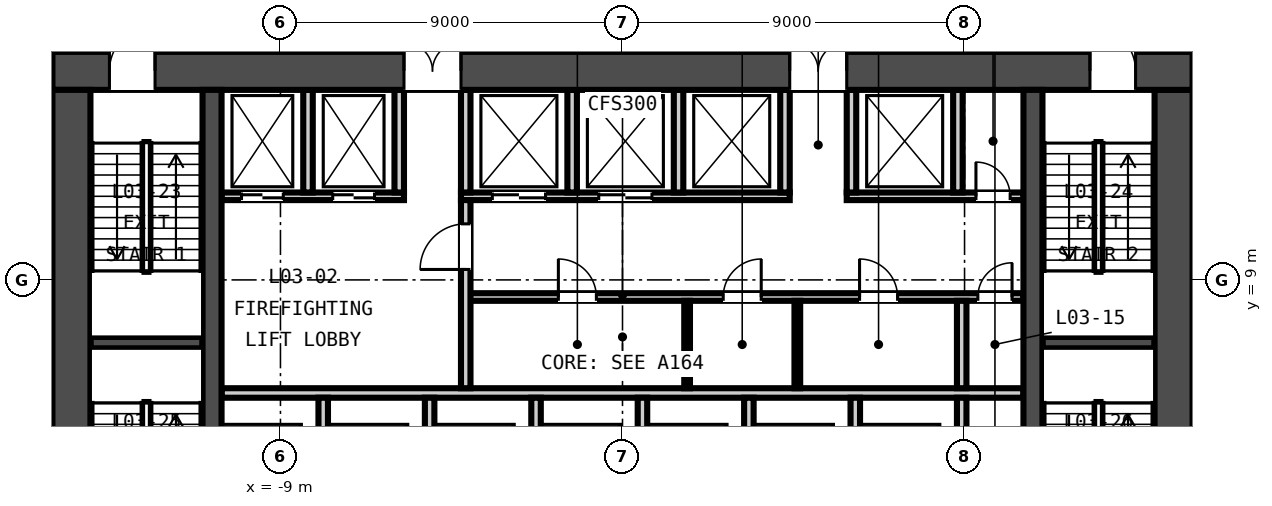
"""IFC4 building model, lengths in metres.
Left out: names, types, materials, properties, quantities, classifications, styles, units other than length and angle.
Written with IfcOpenShell. Run it as: python <this file> out.ifc"""

import sys

from ifc_helpers import new_model, si_unit, direction, frame, frame_2d, origin, place, context, subcontext, project, spatial, rectangle, extrude, element, fill, save


model = new_model("IFC4")
c1 = context("Model", 3, precision=1e-05, world=origin(), true_north=direction((0.0, 1.0)))
c2 = subcontext(c1, "Body", "Model", "MODEL_VIEW")
j1 = project(units=[si_unit("LENGTHUNIT", "METRE"), si_unit("PLANEANGLEUNIT", "RADIAN")], contexts=[c1])
p1 = place(None, origin())
s1 = spatial("IfcSite", under=j1, at=p1, CompositionType="ELEMENT")
p2 = place(p1, origin())
s2 = spatial("IfcBuilding", under=s1, at=p2, CompositionType="ELEMENT")
p3 = place(p2, frame((0.0, 0.0, 22.5)))
s3 = spatial("IfcBuildingStorey", under=s2, at=p3, CompositionType="ELEMENT", Elevation=22.5)
p4 = place(p3, frame((-15.0, 14.5, -0.3), z_axis=(0.0, 0.0, 1.0), x_axis=(1.0, 0.0, 0.0)))
e1 = element("IfcWall", 1, at=p4, inside=s3, PredefinedType="SOLIDWALL", context=c2, shape_type="SweptSolid", body=[
    extrude(rectangle(XDim=30.0, YDim=1.0, at=frame_2d((15.0, 0.0))), origin(), (0.0, 0.0, 1.0), 4.5),
])
p5 = place(p4, frame((9.25, 0.0, 0.3)))
e2 = element("IfcOpeningElement", 2, at=p5, cuts=e1, PredefinedType="OPENING", context=c2, shape_type="SweptSolid", body=[
    extrude(rectangle(XDim=1.5, YDim=2.1, at=frame_2d((0.75, 1.05))), frame((0.0, 0.51, 0.0), z_axis=(0.0, -1.0, 0.0), x_axis=(1.0, 0.0, 0.0)), (0.0, 0.0, 1.0), 1.02),
])
p6 = place(p4, frame((19.4, 0.0, 0.3)))
e3 = element("IfcOpeningElement", 3, at=p6, cuts=e1, PredefinedType="OPENING", context=c2, shape_type="SweptSolid", body=[
    extrude(rectangle(XDim=1.5, YDim=2.1, at=frame_2d((0.75, 1.05))), frame((0.0, 0.51, 0.0), z_axis=(0.0, -1.0, 0.0), x_axis=(1.0, 0.0, 0.0)), (0.0, 0.0, 1.0), 1.02),
])
p7 = place(p4, frame((1.5, 0.0, 0.3)))
e4 = element("IfcOpeningElement", 4, at=p7, cuts=e1, PredefinedType="OPENING", context=c2, shape_type="SweptSolid", body=[
    extrude(rectangle(XDim=1.2, YDim=2.1, at=frame_2d((0.6, 1.05))), frame((0.0, 0.51, 0.0), z_axis=(0.0, -1.0, 0.0), x_axis=(1.0, 0.0, 0.0)), (0.0, 0.0, 1.0), 1.02),
])
p8 = place(p4, frame((27.3, 0.0, 0.3)))
e5 = element("IfcOpeningElement", 5, at=p8, cuts=e1, PredefinedType="OPENING", context=c2, shape_type="SweptSolid", body=[
    extrude(rectangle(XDim=1.2, YDim=2.1, at=frame_2d((0.6, 1.05))), frame((0.0, 0.51, 0.0), z_axis=(0.0, -1.0, 0.0), x_axis=(1.0, 0.0, 0.0)), (0.0, 0.0, 1.0), 1.02),
])
for number, where, z_axis, x_axis in (
    (6, (-14.5, 1.0, -0.3), (0.0, 0.0, 1.0), (0.0, 1.0, 0.0)),
    (7, (14.5, 1.0, -0.3), (0.0, 0.0, 1.0), (0.0, 1.0, 0.0)),
):
    element("IfcWall", number, at=place(p3, frame(where, z_axis=z_axis, x_axis=x_axis)), inside=s3, PredefinedType="SOLIDWALL", context=c2, shape_type="SweptSolid", body=[
        extrude(rectangle(XDim=13.0, YDim=1.0, at=frame_2d((6.5, 0.0))), origin(), (0.0, 0.0, 1.0), 4.5),
    ])
for number, where, z_axis, x_axis in (
    (8, (-10.8, 1.0, -0.3), (0.0, 0.0, 1.0), (0.0, 1.0, 0.0)),
    (9, (10.8, 1.0, -0.3), (0.0, 0.0, 1.0), (0.0, 1.0, 0.0)),
):
    element("IfcWall", number, at=place(p3, frame(where, z_axis=z_axis, x_axis=x_axis)), inside=s3, PredefinedType="SOLIDWALL", context=c2, shape_type="SweptSolid", body=[
        extrude(rectangle(XDim=13.0, YDim=0.5, at=frame_2d((6.5, 0.0))), origin(), (0.0, 0.0, 1.0), 4.5),
    ])
p9 = place(p3, frame((-10.55, 6.025, 0.0), z_axis=(0.0, 0.0, 1.0), x_axis=(1.0, 0.0, 0.0)))
e10 = element("IfcWall", 10, at=p9, inside=s3, PredefinedType="PARTITIONING", context=c2, shape_type="SweptSolid", body=[
    extrude(rectangle(XDim=21.1, YDim=0.25, at=frame_2d((10.55, 0.0))), origin(), (0.0, 0.0, 1.0), 4.2),
])
p10 = place(p3, frame((-4.125, 8.55, 0.0), z_axis=(0.0, 0.0, 1.0), x_axis=(1.0, 0.0, 0.0)))
e11 = element("IfcWall", 11, at=p10, inside=s3, PredefinedType="PARTITIONING", context=c2, shape_type="SweptSolid", body=[
    extrude(rectangle(XDim=14.675, YDim=0.2, at=frame_2d((7.337, 0.0))), origin(), (0.0, 0.0, 1.0), 4.2),
])
p11 = place(p10, frame((2.438, 0.0, 0.0)))
e12 = element("IfcOpeningElement", 12, at=p11, cuts=e11, PredefinedType="OPENING", context=c2, shape_type="SweptSolid", body=[
    extrude(rectangle(XDim=1.0, YDim=2.1, at=frame_2d((0.5, 1.05))), frame((0.0, 0.11, 0.0), z_axis=(0.0, -1.0, 0.0), x_axis=(1.0, 0.0, 0.0)), (0.0, 0.0, 1.0), 0.22),
])
p12 = place(p10, frame((6.775, 0.0, 0.0)))
e13 = element("IfcOpeningElement", 13, at=p12, cuts=e11, PredefinedType="OPENING", context=c2, shape_type="SweptSolid", body=[
    extrude(rectangle(XDim=1.0, YDim=2.1, at=frame_2d((0.5, 1.05))), frame((0.0, 0.11, 0.0), z_axis=(0.0, -1.0, 0.0), x_axis=(1.0, 0.0, 0.0)), (0.0, 0.0, 1.0), 0.22),
])
p13 = place(p10, frame((10.363, 0.0, 0.0)))
e14 = element("IfcOpeningElement", 14, at=p13, cuts=e11, PredefinedType="OPENING", context=c2, shape_type="SweptSolid", body=[
    extrude(rectangle(XDim=1.0, YDim=2.1, at=frame_2d((0.5, 1.05))), frame((0.0, 0.11, 0.0), z_axis=(0.0, -1.0, 0.0), x_axis=(1.0, 0.0, 0.0)), (0.0, 0.0, 1.0), 0.22),
])
p14 = place(p10, frame((13.475, 0.0, 0.0)))
e15 = element("IfcOpeningElement", 15, at=p14, cuts=e11, PredefinedType="OPENING", context=c2, shape_type="SweptSolid", body=[
    extrude(rectangle(XDim=0.9, YDim=2.1, at=frame_2d((0.45, 1.05))), frame((0.0, 0.11, 0.0), z_axis=(0.0, -1.0, 0.0), x_axis=(1.0, 0.0, 0.0)), (0.0, 0.0, 1.0), 0.22),
])
p15 = place(p3, frame((-10.55, 11.2, 0.0), z_axis=(0.0, 0.0, 1.0), x_axis=(1.0, 0.0, 0.0)))
e16 = element("IfcWall", 16, at=p15, inside=s3, PredefinedType="PARTITIONING", context=c2, shape_type="SweptSolid", body=[
    extrude(rectangle(XDim=4.8, YDim=0.2, at=frame_2d((2.4, 0.0))), origin(), (0.0, 0.0, 1.0), 4.2),
])
p16 = place(p15, frame((0.525, 0.0, 0.0)))
e17 = element("IfcOpeningElement", 17, at=p16, cuts=e16, PredefinedType="OPENING", context=c2, shape_type="SweptSolid", body=[
    extrude(rectangle(XDim=1.1, YDim=2.1, at=frame_2d((0.55, 1.05))), frame((0.0, 0.11, 0.0), z_axis=(0.0, -1.0, 0.0), x_axis=(1.0, 0.0, 0.0)), (0.0, 0.0, 1.0), 0.22),
])
p17 = place(p15, frame((2.925, 0.0, 0.0)))
e18 = element("IfcOpeningElement", 18, at=p17, cuts=e16, PredefinedType="OPENING", context=c2, shape_type="SweptSolid", body=[
    extrude(rectangle(XDim=1.1, YDim=2.1, at=frame_2d((0.55, 1.05))), frame((0.0, 0.11, 0.0), z_axis=(0.0, -1.0, 0.0), x_axis=(1.0, 0.0, 0.0)), (0.0, 0.0, 1.0), 0.22),
])
p18 = place(p3, frame((-4.25, 11.2, 0.0), z_axis=(0.0, 0.0, 1.0), x_axis=(1.0, 0.0, 0.0)))
e19 = element("IfcWall", 19, at=p18, inside=s3, PredefinedType="PARTITIONING", context=c2, shape_type="SweptSolid", body=[
    extrude(rectangle(XDim=8.65, YDim=0.2, at=frame_2d((4.325, 0.0))), origin(), (0.0, 0.0, 1.0), 4.2),
])
p19 = place(p18, frame((0.825, 0.0, 0.0)))
e20 = element("IfcOpeningElement", 20, at=p19, cuts=e19, PredefinedType="OPENING", context=c2, shape_type="SweptSolid", body=[
    extrude(rectangle(XDim=1.4, YDim=2.1, at=frame_2d((0.7, 1.05))), frame((0.0, 0.11, 0.0), z_axis=(0.0, -1.0, 0.0), x_axis=(1.0, 0.0, 0.0)), (0.0, 0.0, 1.0), 0.22),
])
p20 = place(p18, frame((3.625, 0.0, 0.0)))
e21 = element("IfcOpeningElement", 21, at=p20, cuts=e19, PredefinedType="OPENING", context=c2, shape_type="SweptSolid", body=[
    extrude(rectangle(XDim=1.4, YDim=2.1, at=frame_2d((0.7, 1.05))), frame((0.0, 0.11, 0.0), z_axis=(0.0, -1.0, 0.0), x_axis=(1.0, 0.0, 0.0)), (0.0, 0.0, 1.0), 0.22),
])
p21 = place(p3, frame((5.9, 11.2, 0.0), z_axis=(0.0, 0.0, 1.0), x_axis=(1.0, 0.0, 0.0)))
e22 = element("IfcWall", 22, at=p21, inside=s3, PredefinedType="PARTITIONING", context=c2, shape_type="SweptSolid", body=[
    extrude(rectangle(XDim=4.65, YDim=0.2, at=frame_2d((2.325, 0.0))), origin(), (0.0, 0.0, 1.0), 4.2),
])
p22 = place(p21, frame((3.4, 0.0, 0.0)))
e23 = element("IfcOpeningElement", 23, at=p22, cuts=e22, PredefinedType="OPENING", context=c2, shape_type="SweptSolid", body=[
    extrude(rectangle(XDim=0.9, YDim=2.1, at=frame_2d((0.45, 1.05))), frame((0.0, 0.11, 0.0), z_axis=(0.0, -1.0, 0.0), x_axis=(1.0, 0.0, 0.0)), (0.0, 0.0, 1.0), 0.22),
])
p23 = place(p3, frame((-4.125, 6.15, 0.0), z_axis=(0.0, 0.0, 1.0), x_axis=(0.0, 1.0, 0.0)))
e24 = element("IfcWall", 24, at=p23, inside=s3, PredefinedType="PARTITIONING", context=c2, shape_type="SweptSolid", body=[
    extrude(rectangle(XDim=4.95, YDim=0.25, at=frame_2d((2.475, 0.0))), origin(), (0.0, 0.0, 1.0), 4.2),
])
p24 = place(p23, frame((3.125, 0.0, 0.0)))
e25 = element("IfcOpeningElement", 25, at=p24, cuts=e24, PredefinedType="OPENING", context=c2, shape_type="SweptSolid", body=[
    extrude(rectangle(XDim=1.2, YDim=2.1, at=frame_2d((0.6, 1.05))), frame((0.0, 0.135, 0.0), z_axis=(0.0, -1.0, 0.0), x_axis=(1.0, 0.0, 0.0)), (0.0, 0.0, 1.0), 0.27),
])
for number, where, z_axis, x_axis in (
    (26, (-7.875, 3.6, 0.0), (0.0, 0.0, 1.0), (0.0, 1.0, 0.0)),
    (27, (-5.075, 3.6, 0.0), (0.0, 0.0, 1.0), (0.0, 1.0, 0.0)),
    (28, (-2.275, 3.6, 0.0), (0.0, 0.0, 1.0), (0.0, 1.0, 0.0)),
    (29, (0.525, 3.6, 0.0), (0.0, 0.0, 1.0), (0.0, 1.0, 0.0)),
    (30, (3.325, 3.6, 0.0), (0.0, 0.0, 1.0), (0.0, 1.0, 0.0)),
    (31, (6.125, 3.6, 0.0), (0.0, 0.0, 1.0), (0.0, 1.0, 0.0)),
    (32, (8.925, 3.6, 0.0), (0.0, 0.0, 1.0), (0.0, 1.0, 0.0)),
):
    element("IfcWall", number, at=place(p3, frame(where, z_axis=z_axis, x_axis=x_axis)), inside=s3, PredefinedType="PARTITIONING", context=c2, shape_type="SweptSolid", body=[
        extrude(rectangle(XDim=2.3, YDim=0.25, at=frame_2d((1.15, 0.0))), origin(), (0.0, 0.0, 1.0), 4.2),
    ])
for number, where, z_axis, x_axis in (
    (33, (1.7, 6.15, 0.0), (0.0, 0.0, 1.0), (0.0, 1.0, 0.0)),
    (34, (4.6, 6.15, 0.0), (0.0, 0.0, 1.0), (0.0, 1.0, 0.0)),
):
    element("IfcWall", number, at=place(p3, frame(where, z_axis=z_axis, x_axis=x_axis)), inside=s3, PredefinedType="PARTITIONING", context=c2, shape_type="SweptSolid", body=[
        extrude(rectangle(XDim=2.3, YDim=0.15, at=frame_2d((1.15, 0.0))), origin(), (0.0, 0.0, 1.0), 4.2),
    ])
p25 = place(p3, frame((8.925, 6.15, 0.0), z_axis=(0.0, 0.0, 1.0), x_axis=(0.0, 1.0, 0.0)))
e35 = element("IfcWall", 35, at=p25, inside=s3, PredefinedType="PARTITIONING", context=c2, shape_type="SweptSolid", body=[
    extrude(rectangle(XDim=2.3, YDim=0.25, at=frame_2d((1.15, 0.0))), origin(), (0.0, 0.0, 1.0), 4.2),
])
for number, where, z_axis, x_axis in (
    (36, (-8.275, 11.3, 0.0), (0.0, 0.0, 1.0), (0.0, 1.0, 0.0)),
    (37, (-5.875, 11.3, 0.0), (0.0, 0.0, 1.0), (0.0, 1.0, 0.0)),
    (38, (-4.125, 11.3, 0.0), (0.0, 0.0, 1.0), (0.0, 1.0, 0.0)),
    (39, (-1.325, 11.3, 0.0), (0.0, 0.0, 1.0), (0.0, 1.0, 0.0)),
    (40, (1.475, 11.3, 0.0), (0.0, 0.0, 1.0), (0.0, 1.0, 0.0)),
    (41, (4.275, 11.3, 0.0), (0.0, 0.0, 1.0), (0.0, 1.0, 0.0)),
    (42, (6.025, 11.3, 0.0), (0.0, 0.0, 1.0), (0.0, 1.0, 0.0)),
    (43, (8.825, 11.3, 0.0), (0.0, 0.0, 1.0), (0.0, 1.0, 0.0)),
):
    element("IfcWall", number, at=place(p3, frame(where, z_axis=z_axis, x_axis=x_axis)), inside=s3, PredefinedType="PARTITIONING", context=c2, shape_type="SweptSolid", body=[
        extrude(rectangle(XDim=2.7, YDim=0.25, at=frame_2d((1.35, 0.0))), origin(), (0.0, 0.0, 1.0), 4.2),
    ])
for number, where, z_axis, x_axis in (
    (44, (-14.0, 7.35, -0.3), (0.0, 0.0, 1.0), (1.0, 0.0, 0.0)),
    (45, (11.05, 7.35, -0.3), (0.0, 0.0, 1.0), (1.0, 0.0, 0.0)),
):
    element("IfcWall", number, at=place(p3, frame(where, z_axis=z_axis, x_axis=x_axis)), inside=s3, PredefinedType="SOLIDWALL", context=c2, shape_type="SweptSolid", body=[
        extrude(rectangle(XDim=2.95, YDim=0.3, at=frame_2d((1.475, 0.0))), origin(), (0.0, 0.0, 1.0), 4.5),
    ])
p26 = place(p24, origin())
e46 = element("IfcDoor", 46, at=p26, inside=s3, OperationType="SINGLE_SWING_LEFT", PredefinedType="DOOR", context=c2, shape_type="SweptSolid", body=[
    extrude(rectangle(XDim=1.2, YDim=2.1, at=frame_2d((0.6, 1.05))), frame((0.0, 0.025, 0.0), z_axis=(0.0, -1.0, 0.0), x_axis=(1.0, 0.0, 0.0)), (0.0, 0.0, 1.0), 0.05),
])
fill(e25, e46)
p27 = place(p11, origin())
e47 = element("IfcDoor", 47, at=p27, inside=s3, OperationType="SINGLE_SWING_LEFT", PredefinedType="DOOR", context=c2, shape_type="SweptSolid", body=[
    extrude(rectangle(XDim=1.0, YDim=2.1, at=frame_2d((0.5, 1.05))), frame((0.0, 0.025, 0.0), z_axis=(0.0, -1.0, 0.0), x_axis=(1.0, 0.0, 0.0)), (0.0, 0.0, 1.0), 0.05),
])
fill(e12, e47)
p28 = place(p12, origin())
e48 = element("IfcDoor", 48, at=p28, inside=s3, OperationType="SINGLE_SWING_RIGHT", PredefinedType="DOOR", context=c2, shape_type="SweptSolid", body=[
    extrude(rectangle(XDim=1.0, YDim=2.1, at=frame_2d((0.5, 1.05))), frame((0.0, 0.025, 0.0), z_axis=(0.0, -1.0, 0.0), x_axis=(1.0, 0.0, 0.0)), (0.0, 0.0, 1.0), 0.05),
])
fill(e13, e48)
p29 = place(p13, origin())
e49 = element("IfcDoor", 49, at=p29, inside=s3, OperationType="SINGLE_SWING_LEFT", PredefinedType="DOOR", context=c2, shape_type="SweptSolid", body=[
    extrude(rectangle(XDim=1.0, YDim=2.1, at=frame_2d((0.5, 1.05))), frame((0.0, 0.025, 0.0), z_axis=(0.0, -1.0, 0.0), x_axis=(1.0, 0.0, 0.0)), (0.0, 0.0, 1.0), 0.05),
])
fill(e14, e49)
p30 = place(p14, origin())
e50 = element("IfcDoor", 50, at=p30, inside=s3, OperationType="SINGLE_SWING_RIGHT", PredefinedType="DOOR", context=c2, shape_type="SweptSolid", body=[
    extrude(rectangle(XDim=0.9, YDim=2.1, at=frame_2d((0.45, 1.05))), frame((0.0, 0.025, 0.0), z_axis=(0.0, -1.0, 0.0), x_axis=(1.0, 0.0, 0.0)), (0.0, 0.0, 1.0), 0.05),
])
fill(e15, e50)
p31 = place(p16, origin())
e51 = element("IfcDoor", 51, at=p31, inside=s3, OperationType="DOUBLE_DOOR_SLIDING", PredefinedType="DOOR", context=c2, shape_type="SweptSolid", body=[
    extrude(rectangle(XDim=1.1, YDim=2.1, at=frame_2d((0.55, 1.05))), frame((0.0, 0.025, 0.0), z_axis=(0.0, -1.0, 0.0), x_axis=(1.0, 0.0, 0.0)), (0.0, 0.0, 1.0), 0.05),
])
fill(e17, e51)
p32 = place(p17, origin())
e52 = element("IfcDoor", 52, at=p32, inside=s3, OperationType="DOUBLE_DOOR_SLIDING", PredefinedType="DOOR", context=c2, shape_type="SweptSolid", body=[
    extrude(rectangle(XDim=1.1, YDim=2.1, at=frame_2d((0.55, 1.05))), frame((0.0, 0.025, 0.0), z_axis=(0.0, -1.0, 0.0), x_axis=(1.0, 0.0, 0.0)), (0.0, 0.0, 1.0), 0.05),
])
fill(e18, e52)
p33 = place(p19, origin())
e53 = element("IfcDoor", 53, at=p33, inside=s3, OperationType="DOUBLE_DOOR_SLIDING", PredefinedType="DOOR", context=c2, shape_type="SweptSolid", body=[
    extrude(rectangle(XDim=1.4, YDim=2.1, at=frame_2d((0.7, 1.05))), frame((0.0, 0.025, 0.0), z_axis=(0.0, -1.0, 0.0), x_axis=(1.0, 0.0, 0.0)), (0.0, 0.0, 1.0), 0.05),
])
fill(e20, e53)
p34 = place(p20, origin())
e54 = element("IfcDoor", 54, at=p34, inside=s3, OperationType="DOUBLE_DOOR_SLIDING", PredefinedType="DOOR", context=c2, shape_type="SweptSolid", body=[
    extrude(rectangle(XDim=1.4, YDim=2.1, at=frame_2d((0.7, 1.05))), frame((0.0, 0.025, 0.0), z_axis=(0.0, -1.0, 0.0), x_axis=(1.0, 0.0, 0.0)), (0.0, 0.0, 1.0), 0.05),
])
fill(e21, e54)
p35 = place(p22, origin())
e55 = element("IfcDoor", 55, at=p35, inside=s3, OperationType="SINGLE_SWING_LEFT", PredefinedType="DOOR", context=c2, shape_type="SweptSolid", body=[
    extrude(rectangle(XDim=0.9, YDim=2.1, at=frame_2d((0.45, 1.05))), frame((0.0, 0.025, 0.0), z_axis=(0.0, -1.0, 0.0), x_axis=(1.0, 0.0, 0.0)), (0.0, 0.0, 1.0), 0.05),
])
fill(e23, e55)
p36 = place(p5, origin())
e56 = element("IfcDoor", 56, at=p36, inside=s3, OperationType="DOUBLE_DOOR_SINGLE_SWING", PredefinedType="DOOR", context=c2, shape_type="SweptSolid", body=[
    extrude(rectangle(XDim=1.5, YDim=2.1, at=frame_2d((0.75, 1.05))), frame((0.0, 0.025, 0.0), z_axis=(0.0, -1.0, 0.0), x_axis=(1.0, 0.0, 0.0)), (0.0, 0.0, 1.0), 0.05),
])
fill(e2, e56)
p37 = place(p6, origin())
e57 = element("IfcDoor", 57, at=p37, inside=s3, OperationType="DOUBLE_DOOR_SINGLE_SWING", PredefinedType="DOOR", context=c2, shape_type="SweptSolid", body=[
    extrude(rectangle(XDim=1.5, YDim=2.1, at=frame_2d((0.75, 1.05))), frame((0.0, 0.025, 0.0), z_axis=(0.0, -1.0, 0.0), x_axis=(1.0, 0.0, 0.0)), (0.0, 0.0, 1.0), 0.05),
])
fill(e3, e57)
p38 = place(p7, origin())
e58 = element("IfcDoor", 58, at=p38, inside=s3, OperationType="SINGLE_SWING_RIGHT", PredefinedType="DOOR", context=c2, shape_type="SweptSolid", body=[
    extrude(rectangle(XDim=1.2, YDim=2.1, at=frame_2d((0.6, 1.05))), frame((0.0, 0.025, 0.0), z_axis=(0.0, -1.0, 0.0), x_axis=(1.0, 0.0, 0.0)), (0.0, 0.0, 1.0), 0.05),
])
fill(e4, e58)
p39 = place(p8, origin())
e59 = element("IfcDoor", 59, at=p39, inside=s3, OperationType="SINGLE_SWING_LEFT", PredefinedType="DOOR", context=c2, shape_type="SweptSolid", body=[
    extrude(rectangle(XDim=1.2, YDim=2.1, at=frame_2d((0.6, 1.05))), frame((0.0, 0.025, 0.0), z_axis=(0.0, -1.0, 0.0), x_axis=(1.0, 0.0, 0.0)), (0.0, 0.0, 1.0), 0.05),
])
fill(e5, e59)
save(model, sys.argv[1])
